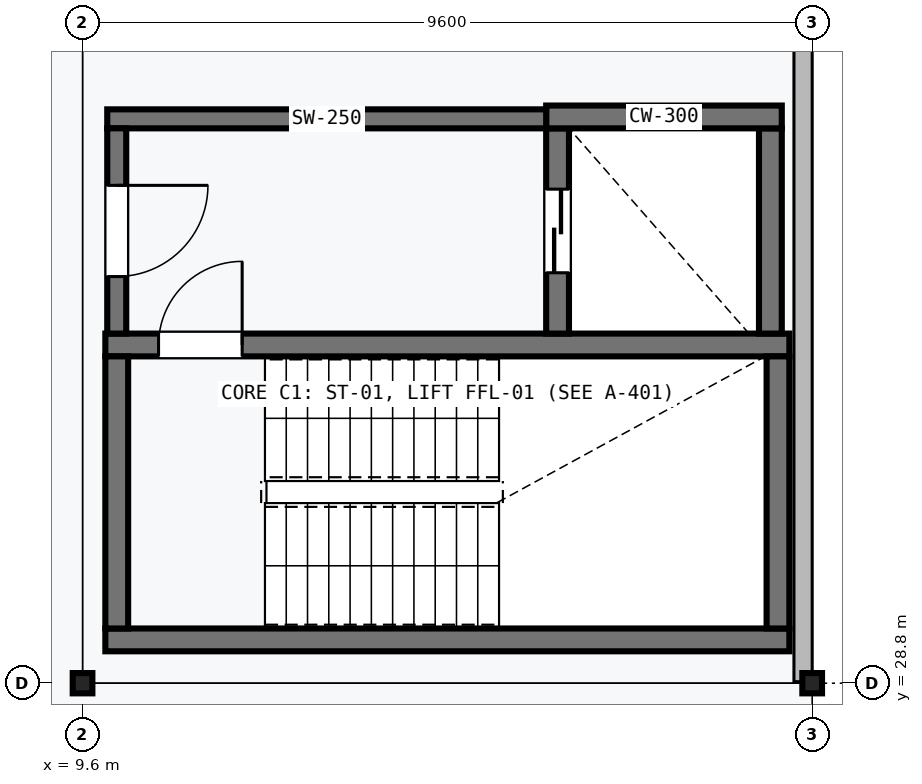
"""IFC4 building model, lengths in metres.
Left out: names, types, materials, properties, quantities, classifications, styles, units other than length and angle.
Written with IfcOpenShell. Run it as: python <this file> out.ifc"""

import sys

from ifc_helpers import new_model, si_unit, direction, frame, frame_2d, origin, origin_2d, place, context, subcontext, project, spatial, rectangle, i_section, extrude, element, fill, save


model = new_model("IFC4")
c1 = context("Model", 3, precision=1e-05, world=origin(), true_north=direction((0.0, 1.0)))
c2 = subcontext(c1, "Body", "Model", "MODEL_VIEW")
j1 = project(units=[si_unit("LENGTHUNIT", "METRE"), si_unit("PLANEANGLEUNIT", "RADIAN")], contexts=[c1])
p1 = place(None, origin())
s1 = spatial("IfcSite", under=j1, at=p1, CompositionType="ELEMENT")
p2 = place(p1, origin())
s2 = spatial("IfcBuilding", under=s1, at=p2, CompositionType="ELEMENT")
p3 = place(p2, frame((0.0, 0.0, 18.9)))
s3 = spatial("IfcBuildingStorey", under=s2, at=p3, CompositionType="ELEMENT", Elevation=18.9)
for number, where, z_axis, x_axis in (
    (1, (9.6, 28.8, 0.0), (0.0, 0.0, 1.0), (1.0, 0.0, 0.0)),
    (2, (19.2, 28.8, 0.0), (0.0, 0.0, 1.0), (1.0, 0.0, 0.0)),
):
    element("IfcColumn", number, at=place(p3, frame(where, z_axis=z_axis, x_axis=x_axis)), inside=s3, PredefinedType="COLUMN", context=c2, shape_type="SweptSolid", body=[
        extrude(i_section(OverallWidth=0.259, OverallDepth=0.267, WebThickness=0.013, FlangeThickness=0.021, FilletRadius=0.013, at=origin_2d()), origin(), (0.0, 0.0, 1.0), 3.95),
    ])
p4 = place(p3, frame((9.9, 29.37, 0.0), z_axis=(0.0, 0.0, 1.0), x_axis=(1.0, 0.0, 0.0)))
e3 = element("IfcWall", 3, at=p4, inside=s3, PredefinedType="SHEAR", context=c2, shape_type="SweptSolid", body=[
    extrude(rectangle(XDim=9.0, YDim=0.3, at=frame_2d((4.5, 0.0))), origin(), (0.0, 0.0, 1.0), 3.95),
])
p5 = place(p3, frame((18.9, 33.25, 0.0), z_axis=(0.0, 0.0, 1.0), x_axis=(-1.0, 0.0, 0.0)))
e4 = element("IfcWall", 4, at=p5, inside=s3, PredefinedType="SHEAR", context=c2, shape_type="SweptSolid", body=[
    extrude(rectangle(XDim=9.0, YDim=0.3, at=frame_2d((4.5, 0.0))), origin(), (0.0, 0.0, 1.0), 3.95),
])
p6 = place(p5, frame((7.2, 0.0, 0.0)))
e5 = element("IfcOpeningElement", 5, at=p6, cuts=e4, PredefinedType="OPENING", context=c2, shape_type="SweptSolid", body=[
    extrude(rectangle(XDim=1.1, YDim=2.15, at=frame_2d((0.55, 1.075))), frame((0.0, 0.16, 0.0), z_axis=(0.0, -1.0, 0.0), x_axis=(1.0, 0.0, 0.0)), (0.0, 0.0, 1.0), 0.32),
])
for number, where, z_axis, x_axis in (
    (6, (10.05, 29.52, 0.0), (0.0, 0.0, 1.0), (0.0, 1.0, 0.0)),
    (7, (18.75, 33.1, 0.0), (0.0, 0.0, 1.0), (0.0, -1.0, 0.0)),
):
    element("IfcWall", number, at=place(p3, frame(where, z_axis=z_axis, x_axis=x_axis)), inside=s3, PredefinedType="SHEAR", context=c2, shape_type="SweptSolid", body=[
        extrude(rectangle(XDim=3.58, YDim=0.3, at=frame_2d((1.79, 0.0))), origin(), (0.0, 0.0, 1.0), 3.95),
    ])
p7 = place(p3, frame((15.85, 36.1, 0.0), z_axis=(0.0, 0.0, 1.0), x_axis=(0.0, -1.0, 0.0)))
e8 = element("IfcWall", 8, at=p7, inside=s3, PredefinedType="SHEAR", context=c2, shape_type="SweptSolid", body=[
    extrude(rectangle(XDim=2.7, YDim=0.3, at=frame_2d((1.35, 0.0))), origin(), (0.0, 0.0, 1.0), 3.95),
])
p8 = place(p7, frame((0.8, 0.0, 0.0)))
e9 = element("IfcOpeningElement", 9, at=p8, cuts=e8, PredefinedType="OPENING", context=c2, shape_type="SweptSolid", body=[
    extrude(rectangle(XDim=1.1, YDim=2.1, at=frame_2d((0.55, 1.05))), frame((0.0, 0.16, 0.0), z_axis=(0.0, -1.0, 0.0), x_axis=(1.0, 0.0, 0.0)), (0.0, 0.0, 1.0), 0.32),
])
p9 = place(p3, frame((18.65, 33.4, 0.0), z_axis=(0.0, 0.0, 1.0), x_axis=(0.0, 1.0, 0.0)))
e10 = element("IfcWall", 10, at=p9, inside=s3, PredefinedType="SHEAR", context=c2, shape_type="SweptSolid", body=[
    extrude(rectangle(XDim=2.7, YDim=0.3, at=frame_2d((1.35, 0.0))), origin(), (0.0, 0.0, 1.0), 3.95),
])
p10 = place(p3, frame((15.7, 36.25, 0.0), z_axis=(0.0, 0.0, 1.0), x_axis=(1.0, 0.0, 0.0)))
e11 = element("IfcWall", 11, at=p10, inside=s3, PredefinedType="SHEAR", context=c2, shape_type="SweptSolid", body=[
    extrude(rectangle(XDim=3.1, YDim=0.3, at=frame_2d((1.55, 0.0))), origin(), (0.0, 0.0, 1.0), 3.95),
])
p11 = place(p3, frame((15.7, 36.225, 0.0), z_axis=(0.0, 0.0, 1.0), x_axis=(-1.0, 0.0, 0.0)))
e12 = element("IfcWall", 12, at=p11, inside=s3, PredefinedType="SHEAR", context=c2, shape_type="SweptSolid", body=[
    extrude(rectangle(XDim=5.775, YDim=0.25, at=frame_2d((2.887, 0.0))), origin(), (0.0, 0.0, 1.0), 3.95),
])
p12 = place(p3, frame((10.05, 33.4, 0.0), z_axis=(0.0, 0.0, 1.0), x_axis=(0.0, 1.0, 0.0)))
e13 = element("IfcWall", 13, at=p12, inside=s3, PredefinedType="SHEAR", context=c2, shape_type="SweptSolid", body=[
    extrude(rectangle(XDim=2.7, YDim=0.25, at=frame_2d((1.35, 0.0))), origin(), (0.0, 0.0, 1.0), 3.95),
])
p13 = place(p12, frame((0.75, 0.0, 0.0)))
e14 = element("IfcOpeningElement", 14, at=p13, cuts=e13, PredefinedType="OPENING", context=c2, shape_type="SweptSolid", body=[
    extrude(rectangle(XDim=1.2, YDim=2.15, at=frame_2d((0.6, 1.075))), frame((0.0, 0.135, 0.0), z_axis=(0.0, -1.0, 0.0), x_axis=(1.0, 0.0, 0.0)), (0.0, 0.0, 1.0), 0.27),
])
p14 = place(p3, frame((19.08, 38.38, 0.0), z_axis=(0.0, 0.0, 1.0), x_axis=(0.0, -1.0, 0.0)))
e15 = element("IfcWall", 15, at=p14, inside=s3, PredefinedType="SOLIDWALL", context=c2, shape_type="SweptSolid", body=[
    extrude(rectangle(XDim=9.56, YDim=0.24, at=frame_2d((4.78, 0.0))), origin(), (0.0, 0.0, 1.0), 3.493),
])
p15 = place(p6, frame((1.1, 0.0, 0.0), z_axis=(0.0, 0.0, 1.0), x_axis=(-1.0, 0.0, 0.0)))
e16 = element("IfcDoor", 16, at=p15, inside=s3, OperationType="SINGLE_SWING_LEFT", PredefinedType="DOOR", context=c2, shape_type="SweptSolid", body=[
    extrude(rectangle(XDim=1.1, YDim=2.15, at=frame_2d((0.55, 1.075))), frame((0.0, 0.025, 0.0), z_axis=(0.0, -1.0, 0.0), x_axis=(1.0, 0.0, 0.0)), (0.0, 0.0, 1.0), 0.05),
])
fill(e5, e16)
p16 = place(p8, frame((1.1, 0.0, 0.0), z_axis=(0.0, 0.0, 1.0), x_axis=(-1.0, 0.0, 0.0)))
e17 = element("IfcDoor", 17, at=p16, inside=s3, OperationType="DOUBLE_DOOR_SLIDING", PredefinedType="DOOR", context=c2, shape_type="SweptSolid", body=[
    extrude(rectangle(XDim=1.1, YDim=2.1, at=frame_2d((0.55, 1.05))), frame((0.0, 0.025, 0.0), z_axis=(0.0, -1.0, 0.0), x_axis=(1.0, 0.0, 0.0)), (0.0, 0.0, 1.0), 0.05),
])
fill(e9, e17)
p17 = place(p13, frame((1.2, 0.0, 0.0), z_axis=(0.0, 0.0, 1.0), x_axis=(-1.0, 0.0, 0.0)))
e18 = element("IfcDoor", 18, at=p17, inside=s3, OperationType="SINGLE_SWING_RIGHT", PredefinedType="DOOR", context=c2, shape_type="SweptSolid", body=[
    extrude(rectangle(XDim=1.2, YDim=2.15, at=frame_2d((0.6, 1.075))), frame((0.0, 0.025, 0.0), z_axis=(0.0, -1.0, 0.0), x_axis=(1.0, 0.0, 0.0)), (0.0, 0.0, 1.0), 0.05),
])
fill(e14, e18)
save(model, sys.argv[1])
